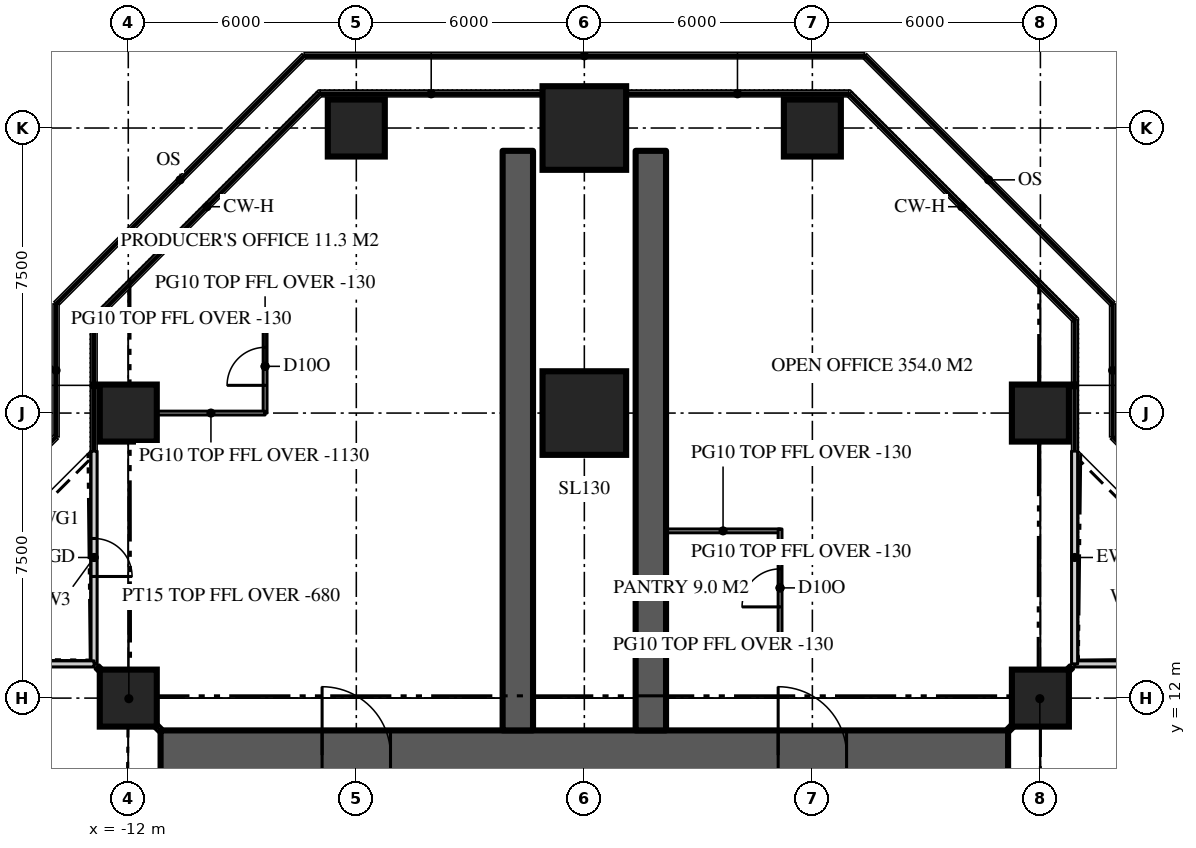
"""IFC4 building model, lengths in metres.
Left out: names, types, materials, properties, quantities, classifications, styles, units other than length and angle.
Written with IfcOpenShell. Run it as: python <this file> out.ifc"""

import sys

from ifc_helpers import new_model, si_unit, direction, frame, frame_2d, origin, origin_2d, place, context, subcontext, project, spatial, rectangle, extrude, element, fill, save


model = new_model("IFC4")
c1 = context("Model", 3, precision=1e-05, world=origin(), true_north=direction((0.0, 1.0)))
c2 = subcontext(c1, "Body", "Model", "MODEL_VIEW")
j1 = project(units=[si_unit("LENGTHUNIT", "METRE"), si_unit("PLANEANGLEUNIT", "RADIAN")], contexts=[c1])
p1 = place(None, origin())
s1 = spatial("IfcSite", under=j1, at=p1, CompositionType="ELEMENT")
p2 = place(p1, origin())
s2 = spatial("IfcBuilding", under=s1, at=p2, CompositionType="ELEMENT")
p3 = place(p2, frame((0.0, 0.0, 212.7)))
s3 = spatial("IfcBuildingStorey", under=s2, at=p3, CompositionType="ELEMENT", Elevation=212.7)
p4 = place(p3, frame((-11.15, 10.5, 0.0), z_axis=(0.0, 0.0, 1.0), x_axis=(1.0, 0.0, 0.0)))
e1 = element("IfcWall", 1, at=p4, inside=s3, PredefinedType="SHEAR", context=c2, shape_type="SweptSolid", body=[
    extrude(rectangle(XDim=22.3, YDim=1.3, at=frame_2d((11.15, 0.0))), origin(), (0.0, 0.0, 1.0), 3.9),
])
p5 = place(p4, frame((4.25, 0.0, 0.0)))
e2 = element("IfcOpeningElement", 2, at=p5, cuts=e1, PredefinedType="OPENING", context=c2, shape_type="SweptSolid", body=[
    extrude(rectangle(XDim=1.8, YDim=2.2, at=frame_2d((0.9, 1.1))), frame((0.0, 0.66, 0.0), z_axis=(0.0, -1.0, 0.0), x_axis=(1.0, 0.0, 0.0)), (0.0, 0.0, 1.0), 1.32),
])
p6 = place(p4, frame((16.25, 0.0, 0.0)))
e3 = element("IfcOpeningElement", 3, at=p6, cuts=e1, PredefinedType="OPENING", context=c2, shape_type="SweptSolid", body=[
    extrude(rectangle(XDim=1.8, YDim=2.2, at=frame_2d((0.9, 1.1))), frame((0.0, 0.66, 0.0), z_axis=(0.0, -1.0, 0.0), x_axis=(1.0, 0.0, 0.0)), (0.0, 0.0, 1.0), 1.32),
])
for number, where, z_axis, x_axis in (
    (4, (1.75, 11.15, 0.0), (0.0, 0.0, 1.0), (0.0, 1.0, 0.0)),
    (5, (-1.75, 11.15, 0.0), (0.0, 0.0, 1.0), (0.0, 1.0, 0.0)),
):
    element("IfcWall", number, at=place(p3, frame(where, z_axis=z_axis, x_axis=x_axis)), inside=s3, PredefinedType="SHEAR", context=c2, shape_type="SweptSolid", body=[
        extrude(rectangle(XDim=15.25, YDim=0.8, at=frame_2d((7.625, 0.0))), origin(), (0.0, 0.0, 1.0), 3.9),
    ])
for number, where, z_axis, x_axis in (
    (6, (-12.0, 12.0, 0.0), (0.0, 0.0, 1.0), (1.0, 0.0, 0.0)),
    (7, (12.0, 12.0, 0.0), (0.0, 0.0, 1.0), (1.0, 0.0, 0.0)),
    (8, (-12.0, 19.5, 0.0), (0.0, 0.0, 1.0), (1.0, 0.0, 0.0)),
):
    element("IfcColumn", number, at=place(p3, frame(where, z_axis=z_axis, x_axis=x_axis)), inside=s3, PredefinedType="COLUMN", context=c2, shape_type="SweptSolid", body=[
        extrude(rectangle(XDim=1.5, YDim=1.5, at=origin_2d()), origin(), (0.0, 0.0, 1.0), 3.9),
    ])
p7 = place(p3, frame((0.0, 19.5, 0.0), z_axis=(0.0, 0.0, 1.0), x_axis=(1.0, 0.0, 0.0)))
e9 = element("IfcColumn", 9, at=p7, inside=s3, PredefinedType="COLUMN", context=c2, shape_type="SweptSolid", body=[
    extrude(rectangle(XDim=2.2, YDim=2.2, at=origin_2d()), origin(), (0.0, 0.0, 1.0), 3.9),
])
for number, where, z_axis, x_axis in (
    (10, (12.0, 19.5, 0.0), (0.0, 0.0, 1.0), (1.0, 0.0, 0.0)),
    (11, (-6.0, 27.0, 0.0), (0.0, 0.0, 1.0), (1.0, 0.0, 0.0)),
):
    element("IfcColumn", number, at=place(p3, frame(where, z_axis=z_axis, x_axis=x_axis)), inside=s3, PredefinedType="COLUMN", context=c2, shape_type="SweptSolid", body=[
        extrude(rectangle(XDim=1.5, YDim=1.5, at=origin_2d()), origin(), (0.0, 0.0, 1.0), 3.9),
    ])
p8 = place(p3, frame((0.0, 27.0, 0.0), z_axis=(0.0, 0.0, 1.0), x_axis=(1.0, 0.0, 0.0)))
e12 = element("IfcColumn", 12, at=p8, inside=s3, PredefinedType="COLUMN", context=c2, shape_type="SweptSolid", body=[
    extrude(rectangle(XDim=2.2, YDim=2.2, at=origin_2d()), origin(), (0.0, 0.0, 1.0), 3.9),
])
p9 = place(p3, frame((6.0, 27.0, 0.0), z_axis=(0.0, 0.0, 1.0), x_axis=(1.0, 0.0, 0.0)))
e13 = element("IfcColumn", 13, at=p9, inside=s3, PredefinedType="COLUMN", context=c2, shape_type="SweptSolid", body=[
    extrude(rectangle(XDim=1.5, YDim=1.5, at=origin_2d()), origin(), (0.0, 0.0, 1.0), 3.9),
])
p10 = place(p3, frame((18.5, 12.9, 0.0), z_axis=(0.0, 0.0, 1.0), x_axis=(-1.0, 0.0, 0.0)))
e14 = element("IfcWall", 14, at=p10, inside=s3, PredefinedType="SOLIDWALL", context=c2, shape_type="SweptSolid", body=[
    extrude(rectangle(XDim=5.6, YDim=0.16, at=frame_2d((2.8, 0.0))), origin(), (0.0, 0.0, 1.0), 3.77),
])
p11 = place(p10, frame((2.3, 0.0, 0.0)))
e15 = element("IfcOpeningElement", 15, at=p11, cuts=e14, PredefinedType="OPENING", context=c2, shape_type="SweptSolid", body=[
    extrude(rectangle(XDim=1.0, YDim=2.2, at=frame_2d((0.5, 1.1))), frame((0.0, 0.09, 0.0), z_axis=(0.0, -1.0, 0.0), x_axis=(1.0, 0.0, 0.0)), (0.0, 0.0, 1.0), 0.18),
])
p12 = place(p3, frame((12.9, 12.9, 0.0), z_axis=(0.0, 0.0, 1.0), x_axis=(0.0, 1.0, 0.0)))
e16 = element("IfcWall", 16, at=p12, inside=s3, PredefinedType="SOLIDWALL", context=c2, shape_type="SweptSolid", body=[
    extrude(rectangle(XDim=5.6, YDim=0.16, at=frame_2d((2.8, 0.0))), origin(), (0.0, 0.0, 1.0), 3.77),
])
p13 = place(p3, frame((-12.9, 18.5, 0.0), z_axis=(0.0, 0.0, 1.0), x_axis=(0.0, -1.0, 0.0)))
e17 = element("IfcWall", 17, at=p13, inside=s3, PredefinedType="SOLIDWALL", context=c2, shape_type="SweptSolid", body=[
    extrude(rectangle(XDim=5.6, YDim=0.16, at=frame_2d((2.8, 0.0))), origin(), (0.0, 0.0, 1.0), 3.77),
])
p14 = place(p13, frame((2.3, 0.0, 0.0)))
e18 = element("IfcOpeningElement", 18, at=p14, cuts=e17, PredefinedType="OPENING", context=c2, shape_type="SweptSolid", body=[
    extrude(rectangle(XDim=1.0, YDim=2.2, at=frame_2d((0.5, 1.1))), frame((0.0, 0.09, 0.0), z_axis=(0.0, -1.0, 0.0), x_axis=(1.0, 0.0, 0.0)), (0.0, 0.0, 1.0), 0.18),
])
p15 = place(p3, frame((-12.9, 12.9, 0.0), z_axis=(0.0, 0.0, 1.0), x_axis=(-1.0, 0.0, 0.0)))
e19 = element("IfcWall", 19, at=p15, inside=s3, PredefinedType="SOLIDWALL", context=c2, shape_type="SweptSolid", body=[
    extrude(rectangle(XDim=5.6, YDim=0.16, at=frame_2d((2.8, 0.0))), origin(), (0.0, 0.0, 1.0), 3.77),
])
p16 = place(p3, frame((-8.4, 19.5, 0.0), z_axis=(0.0, 0.0, 1.0), x_axis=(0.0, 1.0, 0.0)))
e20 = element("IfcWall", 20, at=p16, inside=s3, PredefinedType="PARTITIONING", context=c2, shape_type="SweptSolid", body=[
    extrude(rectangle(XDim=2.459, YDim=0.1, at=frame_2d((1.229, 0.0))), origin(), (0.0, 0.0, 1.0), 3.77),
])
p17 = place(p16, frame((0.729, 0.0, 0.0)))
e21 = element("IfcOpeningElement", 21, at=p17, cuts=e20, PredefinedType="OPENING", context=c2, shape_type="SweptSolid", body=[
    extrude(rectangle(XDim=1.0, YDim=2.2, at=frame_2d((0.5, 1.1))), frame((0.0, 0.06, 0.0), z_axis=(0.0, -1.0, 0.0), x_axis=(1.0, 0.0, 0.0)), (0.0, 0.0, 1.0), 0.12),
])
p18 = place(p3, frame((-8.4, 19.5, 0.0), z_axis=(0.0, 0.0, 1.0), x_axis=(-1.0, 0.0, 0.0)))
e22 = element("IfcWall", 22, at=p18, inside=s3, PredefinedType="PARTITIONING", context=c2, shape_type="SweptSolid", body=[
    extrude(rectangle(XDim=2.85, YDim=0.1, at=frame_2d((1.425, 0.0))), origin(), (0.0, 0.0, 1.0), 2.77),
])
p19 = place(p3, frame((-8.4, 21.959, 0.0), z_axis=(0.0, 0.0, 1.0), x_axis=(-1.0, 0.0, 0.0)))
e23 = element("IfcWall", 23, at=p19, inside=s3, PredefinedType="PARTITIONING", context=c2, shape_type="SweptSolid", body=[
    extrude(rectangle(XDim=4.42, YDim=0.1, at=frame_2d((2.21, 0.0))), origin(), (0.0, 0.0, 1.0), 3.77),
])
for number, where, z_axis, x_axis in (
    (24, (2.15, 13.4, 0.0), (0.0, 0.0, 1.0), (1.0, 0.0, 0.0)),
    (25, (2.15, 16.4, 0.0), (0.0, 0.0, 1.0), (1.0, 0.0, 0.0)),
):
    element("IfcWall", number, at=place(p3, frame(where, z_axis=z_axis, x_axis=x_axis)), inside=s3, PredefinedType="PARTITIONING", context=c2, shape_type="SweptSolid", body=[
        extrude(rectangle(XDim=3.0, YDim=0.1, at=frame_2d((1.5, 0.0))), origin(), (0.0, 0.0, 1.0), 3.77),
    ])
p20 = place(p3, frame((5.15, 13.35, 0.0), z_axis=(0.0, 0.0, 1.0), x_axis=(0.0, 1.0, 0.0)))
e26 = element("IfcWall", 26, at=p20, inside=s3, PredefinedType="PARTITIONING", context=c2, shape_type="SweptSolid", body=[
    extrude(rectangle(XDim=3.1, YDim=0.1, at=frame_2d((1.55, 0.0))), origin(), (0.0, 0.0, 1.0), 3.77),
])
p21 = place(p20, frame((1.05, 0.0, 0.0)))
e27 = element("IfcOpeningElement", 27, at=p21, cuts=e26, PredefinedType="OPENING", context=c2, shape_type="SweptSolid", body=[
    extrude(rectangle(XDim=1.0, YDim=2.2, at=frame_2d((0.5, 1.1))), frame((0.0, 0.06, 0.0), z_axis=(0.0, -1.0, 0.0), x_axis=(1.0, 0.0, 0.0)), (0.0, 0.0, 1.0), 0.12),
])
for number, where, z_axis, x_axis in (
    (28, (11.15, 11.15, 0.0), (0.0, 0.0, 1.0), (0.707, 0.707, 0.0)),
    (29, (-11.15, 11.15, 0.0), (0.0, 0.0, 1.0), (-0.707, 0.707, 0.0)),
):
    element("IfcWall", number, at=place(p3, frame(where, z_axis=z_axis, x_axis=x_axis)), inside=s3, PredefinedType="PARTITIONING", context=c2, shape_type="SweptSolid", body=[
        extrude(rectangle(XDim=2.362, YDim=0.15, at=frame_2d((1.181, 0.0))), origin(), (0.0, 0.0, 1.0), 3.22),
    ])
p22 = place(p14, origin())
e30 = element("IfcDoor", 30, at=p22, inside=s3, OperationType="SINGLE_SWING_RIGHT", PredefinedType="DOOR", context=c2, shape_type="SweptSolid", body=[
    extrude(rectangle(XDim=1.0, YDim=2.2, at=frame_2d((0.5, 1.1))), frame((0.0, 0.025, 0.0), z_axis=(0.0, -1.0, 0.0), x_axis=(1.0, 0.0, 0.0)), (0.0, 0.0, 1.0), 0.05),
])
fill(e18, e30)
p23 = place(p5, origin())
e31 = element("IfcDoor", 31, at=p23, inside=s3, OperationType="DOUBLE_DOOR_DOUBLE_SWING", PredefinedType="DOOR", context=c2, shape_type="SweptSolid", body=[
    extrude(rectangle(XDim=1.8, YDim=2.2, at=frame_2d((0.9, 1.1))), frame((0.0, 0.025, 0.0), z_axis=(0.0, -1.0, 0.0), x_axis=(1.0, 0.0, 0.0)), (0.0, 0.0, 1.0), 0.05),
])
fill(e2, e31)
p24 = place(p6, origin())
e32 = element("IfcDoor", 32, at=p24, inside=s3, OperationType="DOUBLE_DOOR_DOUBLE_SWING", PredefinedType="DOOR", context=c2, shape_type="SweptSolid", body=[
    extrude(rectangle(XDim=1.8, YDim=2.2, at=frame_2d((0.9, 1.1))), frame((0.0, 0.025, 0.0), z_axis=(0.0, -1.0, 0.0), x_axis=(1.0, 0.0, 0.0)), (0.0, 0.0, 1.0), 0.05),
])
fill(e3, e32)
p25 = place(p17, origin())
e33 = element("IfcDoor", 33, at=p25, inside=s3, OperationType="SINGLE_SWING_LEFT", PredefinedType="DOOR", context=c2, shape_type="SweptSolid", body=[
    extrude(rectangle(XDim=1.0, YDim=2.2, at=frame_2d((0.5, 1.1))), frame((0.0, 0.025, 0.0), z_axis=(0.0, -1.0, 0.0), x_axis=(1.0, 0.0, 0.0)), (0.0, 0.0, 1.0), 0.05),
])
fill(e21, e33)
p26 = place(p21, origin())
e34 = element("IfcDoor", 34, at=p26, inside=s3, OperationType="SINGLE_SWING_LEFT", PredefinedType="DOOR", context=c2, shape_type="SweptSolid", body=[
    extrude(rectangle(XDim=1.0, YDim=2.2, at=frame_2d((0.5, 1.1))), frame((0.0, 0.025, 0.0), z_axis=(0.0, -1.0, 0.0), x_axis=(1.0, 0.0, 0.0)), (0.0, 0.0, 1.0), 0.05),
])
fill(e27, e34)
save(model, sys.argv[1])
